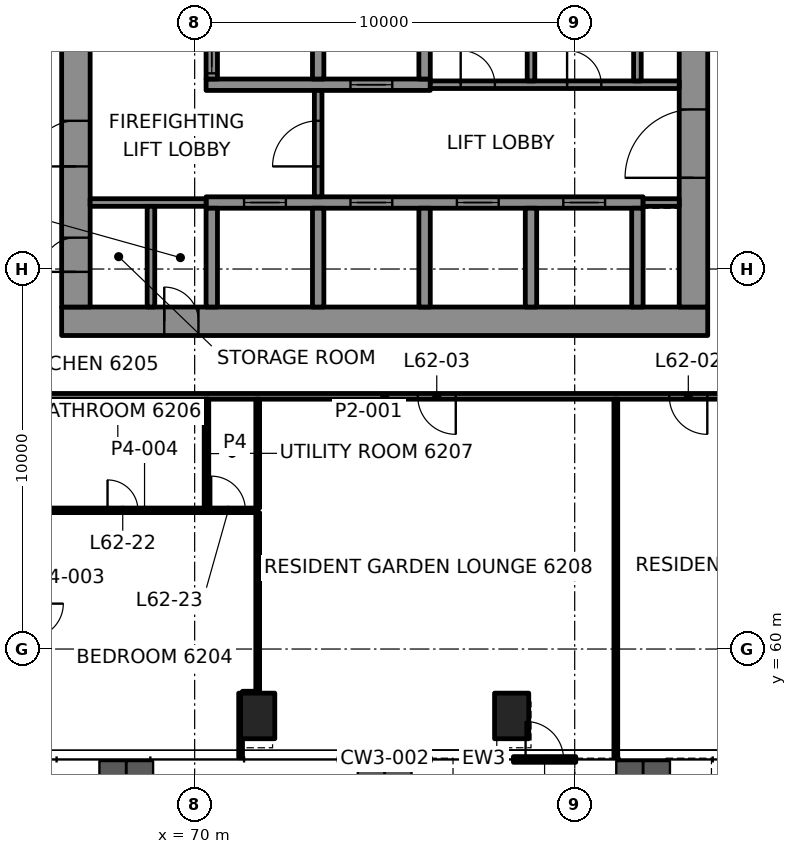
"""IFC4 building model, lengths in metres.
Left out: names, types, materials, properties, quantities, classifications, styles, units other than length and angle.
Written with IfcOpenShell. Run it as: python <this file> out.ifc"""

import sys

from ifc_helpers import new_model, si_unit, direction, frame, frame_2d, origin, origin_2d, place, context, subcontext, project, spatial, rectangle, hollow_rectangle, extrude, element, fill, save


model = new_model("IFC4")
c1 = context("Model", 3, precision=1e-05, world=origin(), true_north=direction((0.0, 1.0)))
c2 = subcontext(c1, "Body", "Model", "MODEL_VIEW")
j1 = project(units=[si_unit("LENGTHUNIT", "METRE"), si_unit("PLANEANGLEUNIT", "RADIAN")], contexts=[c1])
p1 = place(None, origin())
s1 = spatial("IfcSite", under=j1, at=p1, CompositionType="ELEMENT")
p2 = place(p1, origin())
s2 = spatial("IfcBuilding", under=s1, at=p2, CompositionType="ELEMENT")
p3 = place(p2, frame((0.0, 0.0, 263.6)))
s3 = spatial("IfcBuildingStorey", under=s2, at=p3, CompositionType="ELEMENT", Elevation=263.6)
for number, where, z_axis, x_axis in (
    (1, (71.659, 58.239, -0.0), (0.0, 0.0, 1.0), (1.0, 0.0, 0.0)),
    (2, (78.341, 58.239, -0.0), (0.0, 0.0, 1.0), (1.0, 0.0, 0.0)),
):
    element("IfcColumn", number, at=place(p3, frame(where, z_axis=z_axis, x_axis=x_axis)), inside=s3, PredefinedType="COLUMN", context=c2, shape_type="SweptSolid", body=[
        extrude(hollow_rectangle(XDim=0.9, YDim=1.2, WallThickness=0.06, at=origin_2d()), origin(), (0.0, 0.0, 1.0), 3.5),
    ])
p4 = place(p3, frame((66.5, 68.625, 0.0), z_axis=(0.0, 0.0, 1.0), x_axis=(1.0, 0.0, 0.0)))
e3 = element("IfcWall", 3, at=p4, inside=s3, PredefinedType="SHEAR", context=c2, shape_type="SweptSolid", body=[
    extrude(rectangle(XDim=17.0, YDim=0.75, at=frame_2d((8.5, 0.0))), origin(), (0.0, 0.0, 1.0), 3.3),
])
p5 = place(p4, frame((2.7, 0.0, 0.0)))
e4 = element("IfcOpeningElement", 4, at=p5, cuts=e3, PredefinedType="OPENING", context=c2, shape_type="SweptSolid", body=[
    extrude(rectangle(XDim=0.9, YDim=2.1, at=frame_2d((0.45, 1.05))), frame((0.0, 0.385, 0.0), z_axis=(0.0, -1.0, 0.0), x_axis=(1.0, 0.0, 0.0)), (0.0, 0.0, 1.0), 0.77),
])
p6 = place(p3, frame((66.875, 69.0, 0.0), z_axis=(0.0, 0.0, 1.0), x_axis=(0.0, 1.0, 0.0)))
e5 = element("IfcWall", 5, at=p6, inside=s3, PredefinedType="SHEAR", context=c2, shape_type="SweptSolid", body=[
    extrude(rectangle(XDim=12.0, YDim=0.75, at=frame_2d((6.0, 0.0))), origin(), (0.0, 0.0, 1.0), 3.3),
])
p7 = place(p6, frame((3.7, 0.0, 0.0)))
e6 = element("IfcOpeningElement", 6, at=p7, cuts=e5, PredefinedType="OPENING", context=c2, shape_type="SweptSolid", body=[
    extrude(rectangle(XDim=1.2, YDim=2.1, at=frame_2d((0.6, 1.05))), frame((0.0, 0.385, 0.0), z_axis=(0.0, -1.0, 0.0), x_axis=(1.0, 0.0, 0.0)), (0.0, 0.0, 1.0), 0.77),
])
p8 = place(p6, frame((0.925, 0.0, 0.0)))
e7 = element("IfcOpeningElement", 7, at=p8, cuts=e5, PredefinedType="OPENING", context=c2, shape_type="SweptSolid", body=[
    extrude(rectangle(XDim=0.9, YDim=2.1, at=frame_2d((0.45, 1.05))), frame((0.0, 0.385, 0.0), z_axis=(0.0, -1.0, 0.0), x_axis=(1.0, 0.0, 0.0)), (0.0, 0.0, 1.0), 0.77),
])
p9 = place(p3, frame((83.125, 69.0, 0.0), z_axis=(0.0, 0.0, 1.0), x_axis=(0.0, 1.0, 0.0)))
e8 = element("IfcWall", 8, at=p9, inside=s3, PredefinedType="SHEAR", context=c2, shape_type="SweptSolid", body=[
    extrude(rectangle(XDim=12.0, YDim=0.75, at=frame_2d((6.0, 0.0))), origin(), (0.0, 0.0, 1.0), 3.3),
])
p10 = place(p9, frame((3.4, 0.0, 0.0)))
e9 = element("IfcOpeningElement", 9, at=p10, cuts=e8, PredefinedType="OPENING", context=c2, shape_type="SweptSolid", body=[
    extrude(rectangle(XDim=1.8, YDim=2.1, at=frame_2d((0.9, 1.05))), frame((0.0, 0.385, 0.0), z_axis=(0.0, -1.0, 0.0), x_axis=(1.0, 0.0, 0.0)), (0.0, 0.0, 1.0), 0.77),
])
p11 = place(p3, frame((70.3, 71.75, 0.0), z_axis=(0.0, 0.0, 1.0), x_axis=(1.0, 0.0, 0.0)))
e10 = element("IfcWall", 10, at=p11, inside=s3, PredefinedType="SHEAR", context=c2, shape_type="SweptSolid", body=[
    extrude(rectangle(XDim=11.5, YDim=0.3, at=frame_2d((5.75, 0.0))), origin(), (0.0, 0.0, 1.0), 3.3),
])
p12 = place(p11, frame((1.0, 0.0, 0.0)))
e11 = element("IfcOpeningElement", 11, at=p12, cuts=e10, PredefinedType="OPENING", context=c2, shape_type="SweptSolid", body=[
    extrude(rectangle(XDim=1.1, YDim=2.1, at=frame_2d((0.55, 1.05))), frame((0.0, 0.16, 0.0), z_axis=(0.0, -1.0, 0.0), x_axis=(1.0, 0.0, 0.0)), (0.0, 0.0, 1.0), 0.32),
])
p13 = place(p11, frame((3.8, 0.0, 0.0)))
e12 = element("IfcOpeningElement", 12, at=p13, cuts=e10, PredefinedType="OPENING", context=c2, shape_type="SweptSolid", body=[
    extrude(rectangle(XDim=1.1, YDim=2.1, at=frame_2d((0.55, 1.05))), frame((0.0, 0.16, 0.0), z_axis=(0.0, -1.0, 0.0), x_axis=(1.0, 0.0, 0.0)), (0.0, 0.0, 1.0), 0.32),
])
p14 = place(p11, frame((6.6, 0.0, 0.0)))
e13 = element("IfcOpeningElement", 13, at=p14, cuts=e10, PredefinedType="OPENING", context=c2, shape_type="SweptSolid", body=[
    extrude(rectangle(XDim=1.1, YDim=2.1, at=frame_2d((0.55, 1.05))), frame((0.0, 0.16, 0.0), z_axis=(0.0, -1.0, 0.0), x_axis=(1.0, 0.0, 0.0)), (0.0, 0.0, 1.0), 0.32),
])
p15 = place(p11, frame((9.4, 0.0, 0.0)))
e14 = element("IfcOpeningElement", 14, at=p15, cuts=e10, PredefinedType="OPENING", context=c2, shape_type="SweptSolid", body=[
    extrude(rectangle(XDim=1.1, YDim=2.1, at=frame_2d((0.55, 1.05))), frame((0.0, 0.16, 0.0), z_axis=(0.0, -1.0, 0.0), x_axis=(1.0, 0.0, 0.0)), (0.0, 0.0, 1.0), 0.32),
])
p16 = place(p3, frame((70.3, 74.85, 0.0), z_axis=(0.0, 0.0, 1.0), x_axis=(1.0, 0.0, 0.0)))
e15 = element("IfcWall", 15, at=p16, inside=s3, PredefinedType="SHEAR", context=c2, shape_type="SweptSolid", body=[
    extrude(rectangle(XDim=5.9, YDim=0.3, at=frame_2d((2.95, 0.0))), origin(), (0.0, 0.0, 1.0), 3.3),
])
p17 = place(p16, frame((3.8, 0.0, 0.0)))
e16 = element("IfcOpeningElement", 16, at=p17, cuts=e15, PredefinedType="OPENING", context=c2, shape_type="SweptSolid", body=[
    extrude(rectangle(XDim=1.1, YDim=2.1, at=frame_2d((0.55, 1.05))), frame((0.0, 0.16, 0.0), z_axis=(0.0, -1.0, 0.0), x_axis=(1.0, 0.0, 0.0)), (0.0, 0.0, 1.0), 0.32),
])
p18 = place(p3, frame((70.45, 69.0, 0.0), z_axis=(0.0, 0.0, 1.0), x_axis=(0.0, 1.0, 0.0)))
e17 = element("IfcWall", 17, at=p18, inside=s3, PredefinedType="SHEAR", context=c2, shape_type="SweptSolid", body=[
    extrude(rectangle(XDim=2.6, YDim=0.3, at=frame_2d((1.3, 0.0))), origin(), (0.0, 0.0, 1.0), 3.3),
])
p19 = place(p3, frame((70.45, 75.0, 0.0), z_axis=(0.0, 0.0, 1.0), x_axis=(0.0, 1.0, 0.0)))
e18 = element("IfcWall", 18, at=p19, inside=s3, PredefinedType="SHEAR", context=c2, shape_type="SweptSolid", body=[
    extrude(rectangle(XDim=2.6, YDim=0.3, at=frame_2d((1.3, 0.0))), origin(), (0.0, 0.0, 1.0), 3.3),
])
p20 = place(p19, frame((0.15, 0.0, 0.0)))
e19 = element("IfcOpeningElement", 19, at=p20, cuts=e18, PredefinedType="OPENING", context=c2, shape_type="SweptSolid", body=[
    extrude(rectangle(XDim=1.1, YDim=2.1, at=frame_2d((0.55, 1.05))), frame((0.0, 0.16, 0.0), z_axis=(0.0, -1.0, 0.0), x_axis=(1.0, 0.0, 0.0)), (0.0, 0.0, 1.0), 0.32),
])
for number, where, z_axis, x_axis in (
    (20, (73.25, 69.0, 0.0), (0.0, 0.0, 1.0), (0.0, 1.0, 0.0)),
    (21, (73.25, 75.0, 0.0), (0.0, 0.0, 1.0), (0.0, 1.0, 0.0)),
    (22, (76.05, 69.0, 0.0), (0.0, 0.0, 1.0), (0.0, 1.0, 0.0)),
    (23, (76.05, 75.0, 0.0), (0.0, 0.0, 1.0), (0.0, 1.0, 0.0)),
    (24, (78.85, 69.0, 0.0), (0.0, 0.0, 1.0), (0.0, 1.0, 0.0)),
    (25, (81.65, 69.0, 0.0), (0.0, 0.0, 1.0), (0.0, 1.0, 0.0)),
):
    element("IfcWall", number, at=place(p3, frame(where, z_axis=z_axis, x_axis=x_axis)), inside=s3, PredefinedType="SHEAR", context=c2, shape_type="SweptSolid", body=[
        extrude(rectangle(XDim=2.6, YDim=0.3, at=frame_2d((1.3, 0.0))), origin(), (0.0, 0.0, 1.0), 3.3),
    ])
p21 = place(p3, frame((71.259, 58.839, 0.0), z_axis=(0.0, 0.0, 1.0), x_axis=(1.0, 0.0, 0.0)))
e26 = element("IfcWall", 26, at=p21, inside=s3, PredefinedType="PARTITIONING", context=c2, shape_type="SweptSolid", body=[
    extrude(rectangle(XDim=0.349, YDim=0.1, at=frame_2d((0.174, 0.0))), origin(), (0.0, 0.0, 1.0), 2.7),
])
p22 = place(p3, frame((85.1, 66.65, 0.0), z_axis=(0.0, 0.0, 1.0), x_axis=(-1.0, 0.0, 0.0)))
e27 = element("IfcWall", 27, at=p22, inside=s3, PredefinedType="PARTITIONING", context=c2, shape_type="SweptSolid", body=[
    extrude(rectangle(XDim=20.2, YDim=0.15, at=frame_2d((10.1, 0.0))), origin(), (0.0, 0.0, 1.0), 2.7),
])
p23 = place(p22, frame((1.61, 0.0, 0.0)))
e28 = element("IfcOpeningElement", 28, at=p23, cuts=e27, PredefinedType="OPENING", context=c2, shape_type="SweptSolid", body=[
    extrude(rectangle(XDim=1.0, YDim=2.1, at=frame_2d((0.5, 1.05))), frame((0.0, 0.085, 0.0), z_axis=(0.0, -1.0, 0.0), x_axis=(1.0, 0.0, 0.0)), (0.0, 0.0, 1.0), 0.17),
])
p24 = place(p22, frame((8.229, 0.0, 0.0)))
e29 = element("IfcOpeningElement", 29, at=p24, cuts=e27, PredefinedType="OPENING", context=c2, shape_type="SweptSolid", body=[
    extrude(rectangle(XDim=1.0, YDim=2.1, at=frame_2d((0.5, 1.05))), frame((0.0, 0.085, 0.0), z_axis=(0.0, -1.0, 0.0), x_axis=(1.0, 0.0, 0.0)), (0.0, 0.0, 1.0), 0.17),
])
p25 = place(p3, frame((81.082, 57.139, 0.0), z_axis=(0.0, 0.0, 1.0), x_axis=(0.0, 1.0, 0.0)))
e30 = element("IfcWall", 30, at=p25, inside=s3, PredefinedType="PARTITIONING", context=c2, shape_type="SweptSolid", body=[
    extrude(rectangle(XDim=9.436, YDim=0.1, at=frame_2d((4.718, 0.0))), origin(), (0.0, 0.0, 1.0), 2.688),
])
p26 = place(p3, frame((71.659, 58.84, 0.0), z_axis=(0.0, 0.0, 1.0), x_axis=(0.0, 1.0, 0.0)))
e31 = element("IfcWall", 31, at=p26, inside=s3, PredefinedType="PARTITIONING", context=c2, shape_type="SweptSolid", body=[
    extrude(rectangle(XDim=4.75, YDim=0.1, at=frame_2d((2.375, 0.0))), origin(), (0.0, 0.0, 1.0), 2.7),
])
p27 = place(p3, frame((71.209, 57.139, 0.0), z_axis=(0.0, 0.0, 1.0), x_axis=(0.0, 1.0, 0.0)))
e32 = element("IfcWall", 32, at=p27, inside=s3, PredefinedType="PARTITIONING", context=c2, shape_type="SweptSolid", body=[
    extrude(rectangle(XDim=1.699, YDim=0.1, at=frame_2d((0.85, 0.0))), origin(), (0.0, 0.0, 1.0), 2.688),
])
p28 = place(p3, frame((70.311, 63.71, 0.0), z_axis=(0.0, 0.0, 1.0), x_axis=(0.0, 1.0, 0.0)))
e33 = element("IfcWall", 33, at=p28, inside=s3, PredefinedType="PARTITIONING", context=c2, shape_type="SweptSolid", body=[
    extrude(rectangle(XDim=2.865, YDim=0.12, at=frame_2d((1.433, 0.0))), origin(), (0.0, 0.0, 1.0), 2.7),
])
p29 = place(p3, frame((71.659, 63.71, 0.0), z_axis=(0.0, 0.0, 1.0), x_axis=(0.0, 1.0, 0.0)))
e34 = element("IfcWall", 34, at=p29, inside=s3, PredefinedType="PARTITIONING", context=c2, shape_type="SweptSolid", body=[
    extrude(rectangle(XDim=2.865, YDim=0.1, at=frame_2d((1.433, 0.0))), origin(), (0.0, 0.0, 1.0), 2.7),
])
p30 = place(p3, frame((65.704, 63.65, 0.0), z_axis=(0.0, 0.0, 1.0), x_axis=(1.0, 0.0, 0.0)))
e35 = element("IfcWall", 35, at=p30, inside=s3, PredefinedType="PARTITIONING", context=c2, shape_type="SweptSolid", body=[
    extrude(rectangle(XDim=5.955, YDim=0.12, at=frame_2d((2.977, 0.0))), origin(), (0.0, 0.0, 1.0), 2.7),
])
p31 = place(p30, frame((2.003, 0.0, 0.0)))
e36 = element("IfcOpeningElement", 36, at=p31, cuts=e35, PredefinedType="OPENING", context=c2, shape_type="SweptSolid", body=[
    extrude(rectangle(XDim=0.8, YDim=2.1, at=frame_2d((0.4, 1.05))), frame((0.0, 0.07, 0.0), z_axis=(0.0, -1.0, 0.0), x_axis=(1.0, 0.0, 0.0)), (0.0, 0.0, 1.0), 0.14),
])
p32 = place(p30, frame((4.731, 0.0, 0.0)))
e37 = element("IfcOpeningElement", 37, at=p32, cuts=e35, PredefinedType="OPENING", context=c2, shape_type="SweptSolid", body=[
    extrude(rectangle(XDim=0.9, YDim=2.1, at=frame_2d((0.45, 1.05))), frame((0.0, 0.07, 0.0), z_axis=(0.0, -1.0, 0.0), x_axis=(1.0, 0.0, 0.0)), (0.0, 0.0, 1.0), 0.14),
])
p33 = place(p3, frame((67.25, 71.75, 0.0), z_axis=(0.0, 0.0, 1.0), x_axis=(1.0, 0.0, 0.0)))
e38 = element("IfcWall", 38, at=p33, inside=s3, PredefinedType="PARTITIONING", context=c2, shape_type="SweptSolid", body=[
    extrude(rectangle(XDim=3.05, YDim=0.2, at=frame_2d((1.525, 0.0))), origin(), (0.0, 0.0, 1.0), 3.3),
])
p34 = place(p3, frame((81.8, 71.75, 0.0), z_axis=(0.0, 0.0, 1.0), x_axis=(1.0, 0.0, 0.0)))
e39 = element("IfcWall", 39, at=p34, inside=s3, PredefinedType="PARTITIONING", context=c2, shape_type="SweptSolid", body=[
    extrude(rectangle(XDim=0.95, YDim=0.2, at=frame_2d((0.475, 0.0))), origin(), (0.0, 0.0, 1.0), 3.3),
])
p35 = place(p3, frame((76.2, 74.85, 0.0), z_axis=(0.0, 0.0, 1.0), x_axis=(1.0, 0.0, 0.0)))
e40 = element("IfcWall", 40, at=p35, inside=s3, PredefinedType="PARTITIONING", context=c2, shape_type="SweptSolid", body=[
    extrude(rectangle(XDim=6.55, YDim=0.2, at=frame_2d((3.275, 0.0))), origin(), (0.0, 0.0, 1.0), 3.3),
])
p36 = place(p35, frame((0.8, 0.0, 0.0)))
e41 = element("IfcOpeningElement", 41, at=p36, cuts=e40, PredefinedType="OPENING", context=c2, shape_type="SweptSolid", body=[
    extrude(rectangle(XDim=0.9, YDim=2.1, at=frame_2d((0.45, 1.05))), frame((0.0, 0.11, 0.0), z_axis=(0.0, -1.0, 0.0), x_axis=(1.0, 0.0, 0.0)), (0.0, 0.0, 1.0), 0.22),
])
p37 = place(p35, frame((3.6, 0.0, 0.0)))
e42 = element("IfcOpeningElement", 42, at=p37, cuts=e40, PredefinedType="OPENING", context=c2, shape_type="SweptSolid", body=[
    extrude(rectangle(XDim=0.9, YDim=2.1, at=frame_2d((0.45, 1.05))), frame((0.0, 0.11, 0.0), z_axis=(0.0, -1.0, 0.0), x_axis=(1.0, 0.0, 0.0)), (0.0, 0.0, 1.0), 0.22),
])
p38 = place(p3, frame((68.85, 69.0, 0.0), z_axis=(0.0, 0.0, 1.0), x_axis=(0.0, 1.0, 0.0)))
e43 = element("IfcWall", 43, at=p38, inside=s3, PredefinedType="PARTITIONING", context=c2, shape_type="SweptSolid", body=[
    extrude(rectangle(XDim=2.65, YDim=0.2, at=frame_2d((1.325, 0.0))), origin(), (0.0, 0.0, 1.0), 3.3),
])
p39 = place(p3, frame((73.25, 71.9, 0.0), z_axis=(0.0, 0.0, 1.0), x_axis=(0.0, 1.0, 0.0)))
e44 = element("IfcWall", 44, at=p39, inside=s3, PredefinedType="PARTITIONING", context=c2, shape_type="SweptSolid", body=[
    extrude(rectangle(XDim=2.8, YDim=0.2, at=frame_2d((1.4, 0.0))), origin(), (0.0, 0.0, 1.0), 3.3),
])
p40 = place(p39, frame((0.8, 0.0, 0.0)))
e45 = element("IfcOpeningElement", 45, at=p40, cuts=e44, PredefinedType="OPENING", context=c2, shape_type="SweptSolid", body=[
    extrude(rectangle(XDim=1.2, YDim=2.1, at=frame_2d((0.6, 1.05))), frame((0.0, 0.11, 0.0), z_axis=(0.0, -1.0, 0.0), x_axis=(1.0, 0.0, 0.0)), (0.0, 0.0, 1.0), 0.22),
])
for number, where, z_axis, x_axis in (
    (46, (78.85, 74.95, 0.0), (0.0, 0.0, 1.0), (0.0, 1.0, 0.0)),
    (47, (81.65, 74.95, 0.0), (0.0, 0.0, 1.0), (0.0, 1.0, 0.0)),
):
    element("IfcWall", number, at=place(p3, frame(where, z_axis=z_axis, x_axis=x_axis)), inside=s3, PredefinedType="PARTITIONING", context=c2, shape_type="SweptSolid", body=[
        extrude(rectangle(XDim=2.65, YDim=0.2, at=frame_2d((1.325, 0.0))), origin(), (0.0, 0.0, 1.0), 3.3),
    ])
p41 = place(p23, origin())
e48 = element("IfcDoor", 48, at=p41, inside=s3, OperationType="SINGLE_SWING_LEFT", PredefinedType="DOOR", context=c2, shape_type="SweptSolid", body=[
    extrude(rectangle(XDim=1.0, YDim=2.1, at=frame_2d((0.5, 1.05))), frame((0.0, 0.025, 0.0), z_axis=(0.0, -1.0, 0.0), x_axis=(1.0, 0.0, 0.0)), (0.0, 0.0, 1.0), 0.05),
])
fill(e28, e48)
p42 = place(p24, origin())
e49 = element("IfcDoor", 49, at=p42, inside=s3, OperationType="SINGLE_SWING_RIGHT", PredefinedType="DOOR", context=c2, shape_type="SweptSolid", body=[
    extrude(rectangle(XDim=1.0, YDim=2.1, at=frame_2d((0.5, 1.05))), frame((0.0, 0.025, 0.0), z_axis=(0.0, -1.0, 0.0), x_axis=(1.0, 0.0, 0.0)), (0.0, 0.0, 1.0), 0.05),
])
fill(e29, e49)
p43 = place(p31, origin())
e50 = element("IfcDoor", 50, at=p43, inside=s3, OperationType="SINGLE_SWING_RIGHT", PredefinedType="DOOR", context=c2, shape_type="SweptSolid", body=[
    extrude(rectangle(XDim=0.8, YDim=2.1, at=frame_2d((0.4, 1.05))), frame((0.0, 0.025, 0.0), z_axis=(0.0, -1.0, 0.0), x_axis=(1.0, 0.0, 0.0)), (0.0, 0.0, 1.0), 0.05),
])
fill(e36, e50)
p44 = place(p32, origin())
e51 = element("IfcDoor", 51, at=p44, inside=s3, OperationType="SINGLE_SWING_LEFT", PredefinedType="DOOR", context=c2, shape_type="SweptSolid", body=[
    extrude(rectangle(XDim=0.9, YDim=2.1, at=frame_2d((0.45, 1.05))), frame((0.0, 0.025, 0.0), z_axis=(0.0, -1.0, 0.0), x_axis=(1.0, 0.0, 0.0)), (0.0, 0.0, 1.0), 0.05),
])
fill(e37, e51)
p45 = place(p3, frame((78.387, 57.094, 0.0), z_axis=(0.0, 0.0, 1.0), x_axis=(1.0, 0.0, 0.0)))
p46 = place(p45, frame((0.32, 0.0, 0.0)))
p47 = place(p46, origin())
e52 = element("IfcDoor", 52, at=p47, inside=s3, OperationType="SINGLE_SWING_RIGHT", PredefinedType="DOOR", context=c2, shape_type="SweptSolid", body=[
    extrude(rectangle(XDim=1.0, YDim=2.1, at=frame_2d((0.5, 1.05))), frame((0.0, 0.025, 0.0), z_axis=(0.0, -1.0, 0.0), x_axis=(1.0, 0.0, 0.0)), (0.0, 0.0, 1.0), 0.05),
])
p48 = place(p12, origin())
e53 = element("IfcDoor", 53, at=p48, inside=s3, OperationType="DOUBLE_DOOR_SLIDING", PredefinedType="DOOR", context=c2, shape_type="SweptSolid", body=[
    extrude(rectangle(XDim=1.1, YDim=2.1, at=frame_2d((0.55, 1.05))), frame((0.0, 0.025, 0.0), z_axis=(0.0, -1.0, 0.0), x_axis=(1.0, 0.0, 0.0)), (0.0, 0.0, 1.0), 0.05),
])
fill(e11, e53)
p49 = place(p13, origin())
e54 = element("IfcDoor", 54, at=p49, inside=s3, OperationType="DOUBLE_DOOR_SLIDING", PredefinedType="DOOR", context=c2, shape_type="SweptSolid", body=[
    extrude(rectangle(XDim=1.1, YDim=2.1, at=frame_2d((0.55, 1.05))), frame((0.0, 0.025, 0.0), z_axis=(0.0, -1.0, 0.0), x_axis=(1.0, 0.0, 0.0)), (0.0, 0.0, 1.0), 0.05),
])
fill(e12, e54)
p50 = place(p14, origin())
e55 = element("IfcDoor", 55, at=p50, inside=s3, OperationType="DOUBLE_DOOR_SLIDING", PredefinedType="DOOR", context=c2, shape_type="SweptSolid", body=[
    extrude(rectangle(XDim=1.1, YDim=2.1, at=frame_2d((0.55, 1.05))), frame((0.0, 0.025, 0.0), z_axis=(0.0, -1.0, 0.0), x_axis=(1.0, 0.0, 0.0)), (0.0, 0.0, 1.0), 0.05),
])
fill(e13, e55)
p51 = place(p15, origin())
e56 = element("IfcDoor", 56, at=p51, inside=s3, OperationType="DOUBLE_DOOR_SLIDING", PredefinedType="DOOR", context=c2, shape_type="SweptSolid", body=[
    extrude(rectangle(XDim=1.1, YDim=2.1, at=frame_2d((0.55, 1.05))), frame((0.0, 0.025, 0.0), z_axis=(0.0, -1.0, 0.0), x_axis=(1.0, 0.0, 0.0)), (0.0, 0.0, 1.0), 0.05),
])
fill(e14, e56)
p52 = place(p20, origin())
e57 = element("IfcDoor", 57, at=p52, inside=s3, OperationType="DOUBLE_DOOR_SLIDING", PredefinedType="DOOR", context=c2, shape_type="SweptSolid", body=[
    extrude(rectangle(XDim=1.1, YDim=2.1, at=frame_2d((0.55, 1.05))), frame((0.0, 0.025, 0.0), z_axis=(0.0, -1.0, 0.0), x_axis=(1.0, 0.0, 0.0)), (0.0, 0.0, 1.0), 0.05),
])
fill(e19, e57)
p53 = place(p17, origin())
e58 = element("IfcDoor", 58, at=p53, inside=s3, OperationType="DOUBLE_DOOR_SLIDING", PredefinedType="DOOR", context=c2, shape_type="SweptSolid", body=[
    extrude(rectangle(XDim=1.1, YDim=2.1, at=frame_2d((0.55, 1.05))), frame((0.0, 0.025, 0.0), z_axis=(0.0, -1.0, 0.0), x_axis=(1.0, 0.0, 0.0)), (0.0, 0.0, 1.0), 0.05),
])
fill(e16, e58)
p54 = place(p40, origin())
e59 = element("IfcDoor", 59, at=p54, inside=s3, OperationType="SINGLE_SWING_LEFT", PredefinedType="DOOR", context=c2, shape_type="SweptSolid", body=[
    extrude(rectangle(XDim=1.2, YDim=2.1, at=frame_2d((0.6, 1.05))), frame((0.0, 0.025, 0.0), z_axis=(0.0, -1.0, 0.0), x_axis=(1.0, 0.0, 0.0)), (0.0, 0.0, 1.0), 0.05),
])
fill(e45, e59)
p55 = place(p7, origin())
e60 = element("IfcDoor", 60, at=p55, inside=s3, OperationType="SINGLE_SWING_RIGHT", PredefinedType="DOOR", context=c2, shape_type="SweptSolid", body=[
    extrude(rectangle(XDim=1.2, YDim=2.1, at=frame_2d((0.6, 1.05))), frame((0.0, 0.095, 0.0), z_axis=(0.0, -1.0, 0.0), x_axis=(1.0, 0.0, 0.0)), (0.0, 0.0, 1.0), 0.19),
])
fill(e6, e60)
p56 = place(p10, origin())
e61 = element("IfcDoor", 61, at=p56, inside=s3, OperationType="SINGLE_SWING_LEFT", PredefinedType="DOOR", context=c2, shape_type="SweptSolid", body=[
    extrude(rectangle(XDim=1.8, YDim=2.1, at=frame_2d((0.9, 1.05))), frame((0.0, 0.095, 0.0), z_axis=(0.0, -1.0, 0.0), x_axis=(1.0, 0.0, 0.0)), (0.0, 0.0, 1.0), 0.19),
])
fill(e9, e61)
p57 = place(p8, origin())
e62 = element("IfcDoor", 62, at=p57, inside=s3, OperationType="SINGLE_SWING_RIGHT", PredefinedType="DOOR", context=c2, shape_type="SweptSolid", body=[
    extrude(rectangle(XDim=0.9, YDim=2.1, at=frame_2d((0.45, 1.05))), frame((0.0, 0.095, 0.0), z_axis=(0.0, -1.0, 0.0), x_axis=(1.0, 0.0, 0.0)), (0.0, 0.0, 1.0), 0.19),
])
fill(e7, e62)
p58 = place(p5, origin())
e63 = element("IfcDoor", 63, at=p58, inside=s3, OperationType="SINGLE_SWING_LEFT", PredefinedType="DOOR", context=c2, shape_type="SweptSolid", body=[
    extrude(rectangle(XDim=0.9, YDim=2.1, at=frame_2d((0.45, 1.05))), frame((0.0, 0.095, 0.0), z_axis=(0.0, -1.0, 0.0), x_axis=(1.0, 0.0, 0.0)), (0.0, 0.0, 1.0), 0.19),
])
fill(e4, e63)
p59 = place(p36, origin())
e64 = element("IfcDoor", 64, at=p59, inside=s3, OperationType="SINGLE_SWING_RIGHT", PredefinedType="DOOR", context=c2, shape_type="SweptSolid", body=[
    extrude(rectangle(XDim=0.9, YDim=2.1, at=frame_2d((0.45, 1.05))), frame((0.0, 0.025, 0.0), z_axis=(0.0, -1.0, 0.0), x_axis=(1.0, 0.0, 0.0)), (0.0, 0.0, 1.0), 0.05),
])
fill(e41, e64)
p60 = place(p37, origin())
e65 = element("IfcDoor", 65, at=p60, inside=s3, OperationType="SINGLE_SWING_LEFT", PredefinedType="DOOR", context=c2, shape_type="SweptSolid", body=[
    extrude(rectangle(XDim=0.9, YDim=2.1, at=frame_2d((0.45, 1.05))), frame((0.0, 0.025, 0.0), z_axis=(0.0, -1.0, 0.0), x_axis=(1.0, 0.0, 0.0)), (0.0, 0.0, 1.0), 0.05),
])
fill(e42, e65)
save(model, sys.argv[1])
